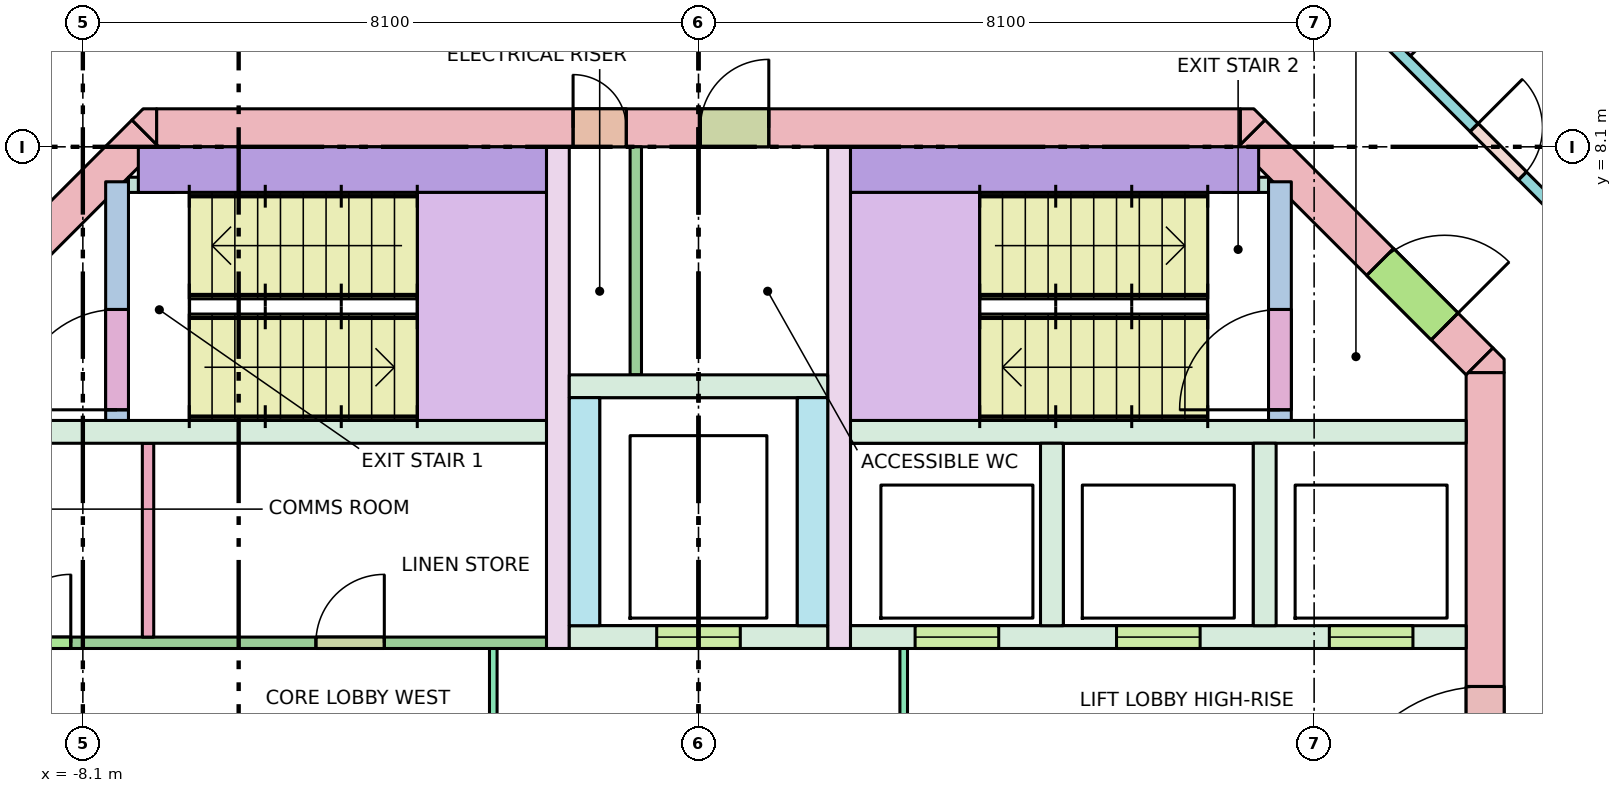
"""IFC4 building model, lengths in metres.
Left out: names, types, materials, properties, quantities, classifications, styles, units other than length and angle.
Written with IfcOpenShell. Run it as: python <this file> out.ifc"""

import sys

from ifc_helpers import new_model, si_unit, direction, frame, frame_2d, origin, place, context, subcontext, project, spatial, polyline, rectangle, outline, extrude, element, fill, save


model = new_model("IFC4")
c1 = context("Model", 3, precision=1e-05, world=origin(), true_north=direction((0.0, 1.0)))
c2 = subcontext(c1, "Body", "Model", "MODEL_VIEW")
j1 = project(units=[si_unit("LENGTHUNIT", "METRE"), si_unit("PLANEANGLEUNIT", "RADIAN")], contexts=[c1])
p1 = place(None, origin())
s1 = spatial("IfcSite", under=j1, at=p1, CompositionType="ELEMENT")
p2 = place(p1, origin())
s2 = spatial("IfcBuilding", under=s1, at=p2, CompositionType="ELEMENT")
p3 = place(p2, frame((0.0, 0.0, 272.3)))
s3 = spatial("IfcBuildingStorey", under=s2, at=p3, CompositionType="ELEMENT", Elevation=272.3)
p4 = place(p3, frame((-7.13, 8.35, -0.28), z_axis=(0.0, 0.0, 1.0), x_axis=(1.0, 0.0, 0.0)))
e1 = element("IfcWall", 1, at=p4, inside=s3, PredefinedType="SHEAR", context=c2, shape_type="SweptSolid", body=[
    extrude(rectangle(XDim=14.26, YDim=0.5, at=frame_2d((7.13, 0.0))), origin(), (0.0, 0.0, 1.0), 3.7),
])
p5 = place(p4, frame((5.48, 0.0, 0.28)))
e2 = element("IfcOpeningElement", 2, at=p5, cuts=e1, PredefinedType="OPENING", context=c2, shape_type="SweptSolid", body=[
    extrude(rectangle(XDim=0.7, YDim=2.1, at=frame_2d((0.35, 1.05))), frame((0.0, 0.26, 0.0), z_axis=(0.0, -1.0, 0.0), x_axis=(1.0, 0.0, 0.0)), (0.0, 0.0, 1.0), 0.52),
])
p6 = place(p4, frame((7.155, 0.0, 0.28)))
e3 = element("IfcOpeningElement", 3, at=p6, cuts=e1, PredefinedType="OPENING", context=c2, shape_type="SweptSolid", body=[
    extrude(rectangle(XDim=0.9, YDim=2.1, at=frame_2d((0.45, 1.05))), frame((0.0, 0.26, 0.0), z_axis=(0.0, -1.0, 0.0), x_axis=(1.0, 0.0, 0.0)), (0.0, 0.0, 1.0), 0.52),
])
p7 = place(p3, frame((10.35, -5.13, -0.28), z_axis=(0.0, 0.0, 1.0), x_axis=(0.0, 1.0, 0.0)))
e4 = element("IfcWall", 4, at=p7, inside=s3, PredefinedType="SHEAR", context=c2, shape_type="SweptSolid", body=[
    extrude(rectangle(XDim=10.26, YDim=0.5, at=frame_2d((5.13, 0.0))), origin(), (0.0, 0.0, 1.0), 3.7),
])
p8 = place(p7, frame((4.13, 0.0, 0.28)))
e5 = element("IfcOpeningElement", 5, at=p8, cuts=e4, PredefinedType="OPENING", context=c2, shape_type="SweptSolid", body=[
    extrude(rectangle(XDim=2.0, YDim=2.1, at=frame_2d((1.0, 1.05))), frame((0.0, 0.26, 0.0), z_axis=(0.0, -1.0, 0.0), x_axis=(1.0, 0.0, 0.0)), (0.0, 0.0, 1.0), 0.52),
])
p9 = place(p3, frame((-10.277, 5.277, -0.28), z_axis=(0.0, 0.0, 1.0), x_axis=(0.707106781187, 0.707106781187, 0.0)))
e6 = element("IfcWall", 6, at=p9, inside=s3, PredefinedType="SHEAR", context=c2, shape_type="SweptSolid", body=[
    extrude(rectangle(XDim=4.243, YDim=0.5, at=frame_2d((2.121, 0.0))), origin(), (0.0, 0.0, 1.0), 3.7),
])
p10 = place(p9, frame((0.65, 0.0, 0.28)))
e7 = element("IfcOpeningElement", 7, at=p10, cuts=e6, PredefinedType="OPENING", context=c2, shape_type="SweptSolid", body=[
    extrude(rectangle(XDim=1.2, YDim=2.1, at=frame_2d((0.6, 1.05))), frame((0.0, 0.26, 0.0), z_axis=(0.0, -1.0, 0.0), x_axis=(1.0, 0.0, 0.0)), (0.0, 0.0, 1.0), 0.52),
])
p11 = place(p3, frame((7.277, 8.277, -0.28), z_axis=(0.0, 0.0, 1.0), x_axis=(0.707106781187, -0.707106781187, 0.0)))
e8 = element("IfcWall", 8, at=p11, inside=s3, PredefinedType="SHEAR", context=c2, shape_type="SweptSolid", body=[
    extrude(rectangle(XDim=4.243, YDim=0.5, at=frame_2d((2.121, 0.0))), origin(), (0.0, 0.0, 1.0), 3.7),
])
p12 = place(p11, frame((2.393, 0.0, 0.28)))
e9 = element("IfcOpeningElement", 9, at=p12, cuts=e8, PredefinedType="OPENING", context=c2, shape_type="SweptSolid", body=[
    extrude(rectangle(XDim=1.2, YDim=2.1, at=frame_2d((0.6, 1.05))), frame((0.0, 0.26, 0.0), z_axis=(0.0, -1.0, 0.0), x_axis=(1.0, 0.0, 0.0)), (0.0, 0.0, 1.0), 0.52),
])
p13 = place(p3, frame((0.0, 0.0, -0.28)))
e10 = element("IfcWall", 10, at=p13, inside=s3, PredefinedType="SHEAR", context=c2, shape_type="SweptSolid", body=[
    extrude(outline(polyline([(10.6, 5.307), (10.6, 5.13), (10.13, 5.13), (10.454, 5.454), (10.6, 5.307)])), origin(), (0.0, 0.0, 1.0), 3.7),
])
p14 = place(p3, frame((0.0, 0.0, -0.28)))
e11 = element("IfcWall", 11, at=p14, inside=s3, PredefinedType="SHEAR", context=c2, shape_type="SweptSolid", body=[
    extrude(outline(polyline([(-7.307, 8.6), (-7.13, 8.6), (-7.13, 8.13), (-7.454, 8.454), (-7.307, 8.6)])), origin(), (0.0, 0.0, 1.0), 3.7),
])
p15 = place(p3, frame((0.0, 0.0, -0.28)))
e12 = element("IfcWall", 12, at=p15, inside=s3, PredefinedType="SHEAR", context=c2, shape_type="SweptSolid", body=[
    extrude(outline(polyline([(7.307, 8.6), (7.454, 8.454), (7.13, 8.13), (7.13, 8.6), (7.307, 8.6)])), origin(), (0.0, 0.0, 1.0), 3.7),
])
for number, where, z_axis, x_axis in (
    (13, (-10.1, 4.35, 0.0), (0.0, 0.0, 1.0), (1.0, 0.0, 0.0)),
    (14, (2.0, 4.35, 0.0), (0.0, 0.0, 1.0), (1.0, 0.0, 0.0)),
):
    element("IfcWall", number, at=place(p3, frame(where, z_axis=z_axis, x_axis=x_axis)), inside=s3, PredefinedType="SOLIDWALL", context=c2, shape_type="SweptSolid", body=[
        extrude(rectangle(XDim=8.1, YDim=0.3, at=frame_2d((4.05, 0.0))), origin(), (0.0, 0.0, 1.0), 3.42),
    ])
p16 = place(p3, frame((2.0, 1.65, 0.0), z_axis=(0.0, 0.0, 1.0), x_axis=(1.0, 0.0, 0.0)))
e15 = element("IfcWall", 15, at=p16, inside=s3, PredefinedType="SOLIDWALL", context=c2, shape_type="SweptSolid", body=[
    extrude(rectangle(XDim=8.1, YDim=0.3, at=frame_2d((4.05, 0.0))), origin(), (0.0, 0.0, 1.0), 3.42),
])
p17 = place(p16, frame((0.85, 0.0, 0.0)))
e16 = element("IfcOpeningElement", 16, at=p17, cuts=e15, PredefinedType="OPENING", context=c2, shape_type="SweptSolid", body=[
    extrude(rectangle(XDim=1.1, YDim=2.1, at=frame_2d((0.55, 1.05))), frame((0.0, 0.16, 0.0), z_axis=(0.0, -1.0, 0.0), x_axis=(1.0, 0.0, 0.0)), (0.0, 0.0, 1.0), 0.32),
])
p18 = place(p16, frame((3.5, 0.0, 0.0)))
e17 = element("IfcOpeningElement", 17, at=p18, cuts=e15, PredefinedType="OPENING", context=c2, shape_type="SweptSolid", body=[
    extrude(rectangle(XDim=1.1, YDim=2.1, at=frame_2d((0.55, 1.05))), frame((0.0, 0.16, 0.0), z_axis=(0.0, -1.0, 0.0), x_axis=(1.0, 0.0, 0.0)), (0.0, 0.0, 1.0), 0.32),
])
p19 = place(p16, frame((6.3, 0.0, 0.0)))
e18 = element("IfcOpeningElement", 18, at=p19, cuts=e15, PredefinedType="OPENING", context=c2, shape_type="SweptSolid", body=[
    extrude(rectangle(XDim=1.1, YDim=2.1, at=frame_2d((0.55, 1.05))), frame((0.0, 0.16, 0.0), z_axis=(0.0, -1.0, 0.0), x_axis=(1.0, 0.0, 0.0)), (0.0, 0.0, 1.0), 0.32),
])
for number, where, z_axis, x_axis in (
    (19, (4.65, 1.8, 0.0), (0.0, 0.0, 1.0), (0.0, 1.0, 0.0)),
    (20, (7.45, 1.8, 0.0), (0.0, 0.0, 1.0), (0.0, 1.0, 0.0)),
):
    element("IfcWall", number, at=place(p3, frame(where, z_axis=z_axis, x_axis=x_axis)), inside=s3, PredefinedType="SOLIDWALL", context=c2, shape_type="SweptSolid", body=[
        extrude(rectangle(XDim=2.4, YDim=0.3, at=frame_2d((1.2, 0.0))), origin(), (0.0, 0.0, 1.0), 3.42),
    ])
for number, where, z_axis, x_axis in (
    (21, (-1.85, 1.5, 0.0), (0.0, 0.0, 1.0), (0.0, 1.0, 0.0)),
    (22, (1.85, 1.5, 0.0), (0.0, 0.0, 1.0), (0.0, 1.0, 0.0)),
):
    element("IfcWall", number, at=place(p3, frame(where, z_axis=z_axis, x_axis=x_axis)), inside=s3, PredefinedType="SHEAR", context=c2, shape_type="SweptSolid", body=[
        extrude(rectangle(XDim=6.6, YDim=0.3, at=frame_2d((3.3, 0.0))), origin(), (0.0, 0.0, 1.0), 3.42),
    ])
p20 = place(p3, frame((-1.7, 1.65, 0.0), z_axis=(0.0, 0.0, 1.0), x_axis=(1.0, 0.0, 0.0)))
e23 = element("IfcWall", 23, at=p20, inside=s3, PredefinedType="SOLIDWALL", context=c2, shape_type="SweptSolid", body=[
    extrude(rectangle(XDim=3.4, YDim=0.3, at=frame_2d((1.7, 0.0))), origin(), (0.0, 0.0, 1.0), 3.42),
])
p21 = place(p20, frame((1.15, 0.0, 0.0)))
e24 = element("IfcOpeningElement", 24, at=p21, cuts=e23, PredefinedType="OPENING", context=c2, shape_type="SweptSolid", body=[
    extrude(rectangle(XDim=1.1, YDim=2.1, at=frame_2d((0.55, 1.05))), frame((0.0, 0.16, 0.0), z_axis=(0.0, -1.0, 0.0), x_axis=(1.0, 0.0, 0.0)), (0.0, 0.0, 1.0), 0.32),
])
for number, where, z_axis, x_axis in (
    (25, (-1.5, 1.8, 0.0), (0.0, 0.0, 1.0), (0.0, 1.0, 0.0)),
    (26, (1.5, 1.8, 0.0), (0.0, 0.0, 1.0), (0.0, 1.0, 0.0)),
):
    element("IfcWall", number, at=place(p3, frame(where, z_axis=z_axis, x_axis=x_axis)), inside=s3, PredefinedType="SOLIDWALL", context=c2, shape_type="SweptSolid", body=[
        extrude(rectangle(XDim=3.0, YDim=0.4, at=frame_2d((1.5, 0.0))), origin(), (0.0, 0.0, 1.0), 3.42),
    ])
p22 = place(p3, frame((-1.7, 4.95, 0.0), z_axis=(0.0, 0.0, 1.0), x_axis=(1.0, 0.0, 0.0)))
e27 = element("IfcWall", 27, at=p22, inside=s3, PredefinedType="SOLIDWALL", context=c2, shape_type="SweptSolid", body=[
    extrude(rectangle(XDim=3.4, YDim=0.3, at=frame_2d((1.7, 0.0))), origin(), (0.0, 0.0, 1.0), 3.42),
])
p23 = place(p3, frame((-7.65, 4.5, 0.0), z_axis=(0.0, 0.0, 1.0), x_axis=(0.0, 1.0, 0.0)))
e28 = element("IfcWall", 28, at=p23, inside=s3, PredefinedType="SHEAR", context=c2, shape_type="SweptSolid", body=[
    extrude(rectangle(XDim=3.14, YDim=0.3, at=frame_2d((1.57, 0.0))), origin(), (0.0, 0.0, 1.0), 3.42),
])
p24 = place(p23, frame((0.14, 0.0, 0.0)))
e29 = element("IfcOpeningElement", 29, at=p24, cuts=e28, PredefinedType="OPENING", context=c2, shape_type="SweptSolid", body=[
    extrude(rectangle(XDim=1.32, YDim=2.1, at=frame_2d((0.66, 1.05))), frame((0.0, 0.16, 0.0), z_axis=(0.0, -1.0, 0.0), x_axis=(1.0, 0.0, 0.0)), (0.0, 0.0, 1.0), 0.32),
])
p25 = place(p3, frame((-7.37, 7.8, 0.0), z_axis=(0.0, 0.0, 1.0), x_axis=(1.0, 0.0, 0.0)))
e30 = element("IfcWall", 30, at=p25, inside=s3, PredefinedType="SHEAR", context=c2, shape_type="SweptSolid", body=[
    extrude(rectangle(XDim=5.37, YDim=0.6, at=frame_2d((2.685, 0.0))), origin(), (0.0, 0.0, 1.0), 3.42),
])
p26 = place(p3, frame((7.65, 4.5, 0.0), z_axis=(0.0, 0.0, 1.0), x_axis=(0.0, 1.0, 0.0)))
e31 = element("IfcWall", 31, at=p26, inside=s3, PredefinedType="SHEAR", context=c2, shape_type="SweptSolid", body=[
    extrude(rectangle(XDim=3.14, YDim=0.3, at=frame_2d((1.57, 0.0))), origin(), (0.0, 0.0, 1.0), 3.42),
])
p27 = place(p26, frame((0.14, 0.0, 0.0)))
e32 = element("IfcOpeningElement", 32, at=p27, cuts=e31, PredefinedType="OPENING", context=c2, shape_type="SweptSolid", body=[
    extrude(rectangle(XDim=1.32, YDim=2.1, at=frame_2d((0.66, 1.05))), frame((0.0, 0.16, 0.0), z_axis=(0.0, -1.0, 0.0), x_axis=(1.0, 0.0, 0.0)), (0.0, 0.0, 1.0), 0.32),
])
p28 = place(p3, frame((2.0, 7.8, 0.0), z_axis=(0.0, 0.0, 1.0), x_axis=(1.0, 0.0, 0.0)))
e33 = element("IfcWall", 33, at=p28, inside=s3, PredefinedType="SHEAR", context=c2, shape_type="SweptSolid", body=[
    extrude(rectangle(XDim=5.37, YDim=0.6, at=frame_2d((2.685, 0.0))), origin(), (0.0, 0.0, 1.0), 3.42),
])
for number, where, z_axis, x_axis in (
    (34, (-7.5, 7.6, 0.0), (0.0, 0.0, 1.0), (1.0, 0.0, 0.0)),
    (35, (6.9, 7.6, 0.0), (0.0, 0.0, 1.0), (1.0, 0.0, 0.0)),
):
    element("IfcWall", number, at=place(p3, frame(where, z_axis=z_axis, x_axis=x_axis)), inside=s3, PredefinedType="SHEAR", context=c2, shape_type="SweptSolid", body=[
        extrude(rectangle(XDim=0.6, YDim=0.2, at=frame_2d((0.3, 0.0))), origin(), (0.0, 0.0, 1.0), 3.42),
    ])
p29 = place(p3, frame((-2.7, -1.5, 0.0), z_axis=(0.0, 0.0, 1.0), x_axis=(0.0, 1.0, 0.0)))
e36 = element("IfcWall", 36, at=p29, inside=s3, PredefinedType="PARTITIONING", context=c2, shape_type="SweptSolid", body=[
    extrude(rectangle(XDim=3.0, YDim=0.1, at=frame_2d((1.5, 0.0))), origin(), (0.0, 0.0, 1.0), 3.42),
])
p30 = place(p29, frame((0.9, 0.0, 0.0)))
e37 = element("IfcOpeningElement", 37, at=p30, cuts=e36, PredefinedType="OPENING", context=c2, shape_type="SweptSolid", body=[
    extrude(rectangle(XDim=1.2, YDim=2.1, at=frame_2d((0.6, 1.05))), frame((0.0, 0.06, 0.0), z_axis=(0.0, -1.0, 0.0), x_axis=(1.0, 0.0, 0.0)), (0.0, 0.0, 1.0), 0.12),
])
p31 = place(p3, frame((2.7, -1.5, 0.0), z_axis=(0.0, 0.0, 1.0), x_axis=(0.0, 1.0, 0.0)))
e38 = element("IfcWall", 38, at=p31, inside=s3, PredefinedType="PARTITIONING", context=c2, shape_type="SweptSolid", body=[
    extrude(rectangle(XDim=3.0, YDim=0.1, at=frame_2d((1.5, 0.0))), origin(), (0.0, 0.0, 1.0), 3.42),
])
p32 = place(p31, frame((0.9, 0.0, 0.0)))
e39 = element("IfcOpeningElement", 39, at=p32, cuts=e38, PredefinedType="OPENING", context=c2, shape_type="SweptSolid", body=[
    extrude(rectangle(XDim=1.2, YDim=2.1, at=frame_2d((0.6, 1.05))), frame((0.0, 0.06, 0.0), z_axis=(0.0, -1.0, 0.0), x_axis=(1.0, 0.0, 0.0)), (0.0, 0.0, 1.0), 0.12),
])
p33 = place(p3, frame((-0.825, 5.1, 0.0), z_axis=(0.0, 0.0, 1.0), x_axis=(0.0, 1.0, 0.0)))
e40 = element("IfcWall", 40, at=p33, inside=s3, PredefinedType="PARTITIONING", context=c2, shape_type="SweptSolid", body=[
    extrude(rectangle(XDim=3.0, YDim=0.15, at=frame_2d((1.5, 0.0))), origin(), (0.0, 0.0, 1.0), 3.42),
])
p34 = place(p3, frame((-7.242, 1.65, 0.0), z_axis=(0.0, 0.0, 1.0), x_axis=(0.0, 1.0, 0.0)))
e41 = element("IfcWall", 41, at=p34, inside=s3, PredefinedType="PARTITIONING", context=c2, shape_type="SweptSolid", body=[
    extrude(rectangle(XDim=2.55, YDim=0.15, at=frame_2d((1.275, 0.0))), origin(), (0.0, 0.0, 1.0), 3.42),
])
p35 = place(p3, frame((-10.1, 1.575, 0.0), z_axis=(0.0, 0.0, 1.0), x_axis=(1.0, 0.0, 0.0)))
e42 = element("IfcWall", 42, at=p35, inside=s3, PredefinedType="PARTITIONING", context=c2, shape_type="SweptSolid", body=[
    extrude(rectangle(XDim=8.1, YDim=0.15, at=frame_2d((4.05, 0.0))), origin(), (0.0, 0.0, 1.0), 3.42),
])
p36 = place(p35, frame((0.941, 0.0, 0.0)))
e43 = element("IfcOpeningElement", 43, at=p36, cuts=e42, PredefinedType="OPENING", context=c2, shape_type="SweptSolid", body=[
    extrude(rectangle(XDim=0.9, YDim=2.1, at=frame_2d((0.45, 1.05))), frame((0.0, 0.085, 0.0), z_axis=(0.0, -1.0, 0.0), x_axis=(1.0, 0.0, 0.0)), (0.0, 0.0, 1.0), 0.17),
])
p37 = place(p35, frame((5.066, 0.0, 0.0)))
e44 = element("IfcOpeningElement", 44, at=p37, cuts=e42, PredefinedType="OPENING", context=c2, shape_type="SweptSolid", body=[
    extrude(rectangle(XDim=0.9, YDim=2.1, at=frame_2d((0.45, 1.05))), frame((0.0, 0.085, 0.0), z_axis=(0.0, -1.0, 0.0), x_axis=(1.0, 0.0, 0.0)), (0.0, 0.0, 1.0), 0.17),
])
p38 = place(p3, frame((-12.438, 6.121, 0.0), z_axis=(0.0, 0.0, 1.0), x_axis=(0.707106781187, 0.707106781187, 0.0)))
e45 = element("IfcWall", 45, at=p38, inside=s3, PredefinedType="PARTITIONING", context=c2, shape_type="SweptSolid", body=[
    extrude(rectangle(XDim=6.105, YDim=0.15, at=frame_2d((3.053, 0.0))), origin(), (0.0, 0.0, 1.0), 2.52),
])
p39 = place(p38, frame((2.602, 0.0, 0.0)))
e46 = element("IfcOpeningElement", 46, at=p39, cuts=e45, PredefinedType="OPENING", context=c2, shape_type="SweptSolid", body=[
    extrude(rectangle(XDim=1.8, YDim=2.1, at=frame_2d((0.9, 1.05))), frame((0.0, 0.085, 0.0), z_axis=(0.0, -1.0, 0.0), x_axis=(1.0, 0.0, 0.0)), (0.0, 0.0, 1.0), 0.17),
])
p40 = place(p3, frame((8.121, 10.438, 0.0), z_axis=(0.0, 0.0, 1.0), x_axis=(0.707106781187, -0.707106781187, 0.0)))
e47 = element("IfcWall", 47, at=p40, inside=s3, PredefinedType="PARTITIONING", context=c2, shape_type="SweptSolid", body=[
    extrude(rectangle(XDim=6.105, YDim=0.15, at=frame_2d((3.053, 0.0))), origin(), (0.0, 0.0, 1.0), 2.52),
])
p41 = place(p40, frame((2.948, 0.0, 0.0)))
e48 = element("IfcOpeningElement", 48, at=p41, cuts=e47, PredefinedType="OPENING", context=c2, shape_type="SweptSolid", body=[
    extrude(rectangle(XDim=0.9, YDim=2.1, at=frame_2d((0.45, 1.05))), frame((0.0, 0.085, 0.0), z_axis=(0.0, -1.0, 0.0), x_axis=(1.0, 0.0, 0.0)), (0.0, 0.0, 1.0), 0.17),
])
p42 = place(p3, frame((9.333, 9.333, 0.0), z_axis=(0.0, 0.0, 1.0), x_axis=(0.707106781187, 0.707106781187, 0.0)))
e49 = element("IfcWall", 49, at=p42, inside=s3, PredefinedType="PARTITIONING", context=c2, shape_type="SweptSolid", body=[
    extrude(rectangle(XDim=7.639, YDim=0.1, at=frame_2d((3.819, 0.0))), origin(), (0.0, 0.0, 1.0), 2.52),
])
p43 = place(p17, origin())
e50 = element("IfcDoor", 50, at=p43, inside=s3, OperationType="DOUBLE_DOOR_SLIDING", PredefinedType="DOOR", context=c2, shape_type="SweptSolid", body=[
    extrude(rectangle(XDim=1.1, YDim=2.1, at=frame_2d((0.55, 1.05))), frame((0.0, 0.025, 0.0), z_axis=(0.0, -1.0, 0.0), x_axis=(1.0, 0.0, 0.0)), (0.0, 0.0, 1.0), 0.05),
])
fill(e16, e50)
p44 = place(p18, origin())
e51 = element("IfcDoor", 51, at=p44, inside=s3, OperationType="DOUBLE_DOOR_SLIDING", PredefinedType="DOOR", context=c2, shape_type="SweptSolid", body=[
    extrude(rectangle(XDim=1.1, YDim=2.1, at=frame_2d((0.55, 1.05))), frame((0.0, 0.025, 0.0), z_axis=(0.0, -1.0, 0.0), x_axis=(1.0, 0.0, 0.0)), (0.0, 0.0, 1.0), 0.05),
])
fill(e17, e51)
p45 = place(p19, origin())
e52 = element("IfcDoor", 52, at=p45, inside=s3, OperationType="DOUBLE_DOOR_SLIDING", PredefinedType="DOOR", context=c2, shape_type="SweptSolid", body=[
    extrude(rectangle(XDim=1.1, YDim=2.1, at=frame_2d((0.55, 1.05))), frame((0.0, 0.025, 0.0), z_axis=(0.0, -1.0, 0.0), x_axis=(1.0, 0.0, 0.0)), (0.0, 0.0, 1.0), 0.05),
])
fill(e18, e52)
p46 = place(p21, origin())
e53 = element("IfcDoor", 53, at=p46, inside=s3, OperationType="DOUBLE_DOOR_SLIDING", PredefinedType="DOOR", context=c2, shape_type="SweptSolid", body=[
    extrude(rectangle(XDim=1.1, YDim=2.1, at=frame_2d((0.55, 1.05))), frame((0.0, 0.025, 0.0), z_axis=(0.0, -1.0, 0.0), x_axis=(1.0, 0.0, 0.0)), (0.0, 0.0, 1.0), 0.05),
])
fill(e24, e53)
p47 = place(p24, origin())
e54 = element("IfcDoor", 54, at=p47, inside=s3, OperationType="DOUBLE_DOOR_SINGLE_SWING", PredefinedType="DOOR", context=c2, shape_type="SweptSolid", body=[
    extrude(rectangle(XDim=1.32, YDim=2.1, at=frame_2d((0.66, 1.05))), frame((0.0, 0.025, 0.0), z_axis=(0.0, -1.0, 0.0), x_axis=(1.0, 0.0, 0.0)), (0.0, 0.0, 1.0), 0.05),
])
fill(e29, e54)
p48 = place(p27, origin())
e55 = element("IfcDoor", 55, at=p48, inside=s3, OperationType="DOUBLE_DOOR_SINGLE_SWING", PredefinedType="DOOR", context=c2, shape_type="SweptSolid", body=[
    extrude(rectangle(XDim=1.32, YDim=2.1, at=frame_2d((0.66, 1.05))), frame((0.0, 0.025, 0.0), z_axis=(0.0, -1.0, 0.0), x_axis=(1.0, 0.0, 0.0)), (0.0, 0.0, 1.0), 0.05),
])
fill(e32, e55)
p49 = place(p12, origin())
e56 = element("IfcDoor", 56, at=p49, inside=s3, OperationType="SINGLE_SWING_RIGHT", PredefinedType="DOOR", context=c2, shape_type="SweptSolid", body=[
    extrude(rectangle(XDim=1.2, YDim=2.1, at=frame_2d((0.6, 1.05))), frame((0.0, 0.025, 0.0), z_axis=(0.0, -1.0, 0.0), x_axis=(1.0, 0.0, 0.0)), (0.0, 0.0, 1.0), 0.05),
])
fill(e9, e56)
p50 = place(p8, origin())
e57 = element("IfcDoor", 57, at=p50, inside=s3, OperationType="DOUBLE_DOOR_SINGLE_SWING", PredefinedType="DOOR", context=c2, shape_type="SweptSolid", body=[
    extrude(rectangle(XDim=2.0, YDim=2.1, at=frame_2d((1.0, 1.05))), frame((0.0, 0.025, 0.0), z_axis=(0.0, -1.0, 0.0), x_axis=(1.0, 0.0, 0.0)), (0.0, 0.0, 1.0), 0.05),
])
fill(e5, e57)
p51 = place(p5, origin())
e58 = element("IfcDoor", 58, at=p51, inside=s3, OperationType="SINGLE_SWING_LEFT", PredefinedType="DOOR", context=c2, shape_type="SweptSolid", body=[
    extrude(rectangle(XDim=0.7, YDim=2.1, at=frame_2d((0.35, 1.05))), frame((0.0, 0.025, 0.0), z_axis=(0.0, -1.0, 0.0), x_axis=(1.0, 0.0, 0.0)), (0.0, 0.0, 1.0), 0.05),
])
fill(e2, e58)
p52 = place(p6, origin())
e59 = element("IfcDoor", 59, at=p52, inside=s3, OperationType="SINGLE_SWING_RIGHT", PredefinedType="DOOR", context=c2, shape_type="SweptSolid", body=[
    extrude(rectangle(XDim=0.9, YDim=2.1, at=frame_2d((0.45, 1.05))), frame((0.0, 0.025, 0.0), z_axis=(0.0, -1.0, 0.0), x_axis=(1.0, 0.0, 0.0)), (0.0, 0.0, 1.0), 0.05),
])
fill(e3, e59)
p53 = place(p36, origin())
e60 = element("IfcDoor", 60, at=p53, inside=s3, OperationType="SINGLE_SWING_RIGHT", PredefinedType="DOOR", context=c2, shape_type="SweptSolid", body=[
    extrude(rectangle(XDim=0.9, YDim=2.1, at=frame_2d((0.45, 1.05))), frame((0.0, 0.025, 0.0), z_axis=(0.0, -1.0, 0.0), x_axis=(1.0, 0.0, 0.0)), (0.0, 0.0, 1.0), 0.05),
])
fill(e43, e60)
p54 = place(p37, origin())
e61 = element("IfcDoor", 61, at=p54, inside=s3, OperationType="SINGLE_SWING_RIGHT", PredefinedType="DOOR", context=c2, shape_type="SweptSolid", body=[
    extrude(rectangle(XDim=0.9, YDim=2.1, at=frame_2d((0.45, 1.05))), frame((0.0, 0.025, 0.0), z_axis=(0.0, -1.0, 0.0), x_axis=(1.0, 0.0, 0.0)), (0.0, 0.0, 1.0), 0.05),
])
fill(e44, e61)
p55 = place(p41, origin())
e62 = element("IfcDoor", 62, at=p55, inside=s3, OperationType="SINGLE_SWING_LEFT", PredefinedType="DOOR", context=c2, shape_type="SweptSolid", body=[
    extrude(rectangle(XDim=0.9, YDim=2.1, at=frame_2d((0.45, 1.05))), frame((0.0, 0.025, 0.0), z_axis=(0.0, -1.0, 0.0), x_axis=(1.0, 0.0, 0.0)), (0.0, 0.0, 1.0), 0.05),
])
fill(e48, e62)
save(model, sys.argv[1])
